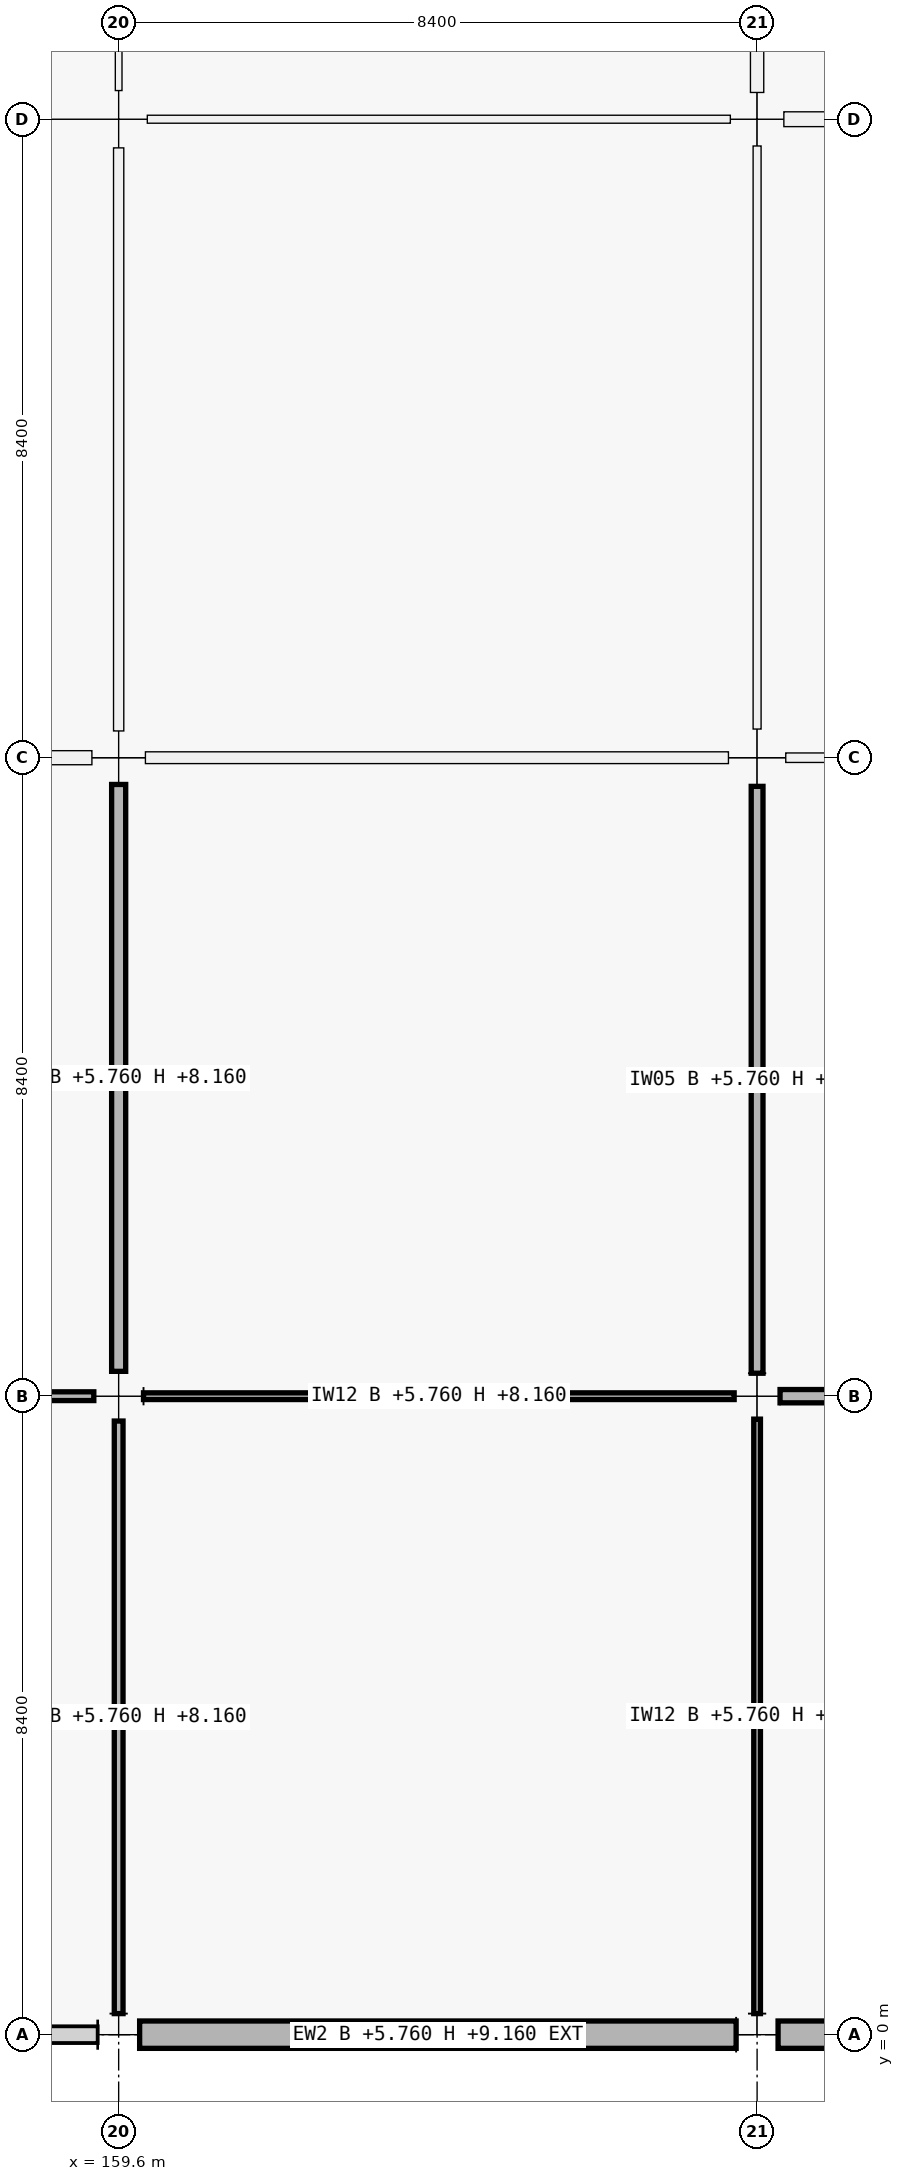
"""IFC4 building model, lengths in metres.
Left out: names, types, materials, properties, quantities, classifications, styles, units other than length and angle.
Written with IfcOpenShell. Run it as: python <this file> out.ifc"""

import sys

from ifc_helpers import new_model, si_unit, direction, frame, frame_2d, origin, origin_2d, place, context, subcontext, project, spatial, rectangle, extrude, element, fill, save


model = new_model("IFC4")
c1 = context("Model", 3, precision=1e-05, world=origin(), true_north=direction((0.0, 1.0)))
c2 = subcontext(c1, "Body", "Model", "MODEL_VIEW")
j1 = project(units=[si_unit("LENGTHUNIT", "METRE"), si_unit("PLANEANGLEUNIT", "RADIAN")], contexts=[c1])
p1 = place(None, origin())
s1 = spatial("IfcSite", under=j1, at=p1, CompositionType="ELEMENT")
p2 = place(p1, origin())
s2 = spatial("IfcBuilding", under=s1, at=p2, CompositionType="ELEMENT")
p3 = place(p2, frame((0.0, 0.0, 5.76)))
s3 = spatial("IfcBuildingStorey", under=s2, at=p3, CompositionType="ELEMENT", Elevation=5.76)
p4 = place(p3, frame((159.6, 0.0, 0.0), z_axis=(0.0, 0.0, 1.0), x_axis=(1.0, 0.0, 0.0)))
e1 = element("IfcColumn", 1, at=p4, inside=s3, PredefinedType="COLUMN", context=c2, shape_type="SweptSolid", body=[
    extrude(rectangle(XDim=0.55, YDim=0.55, at=origin_2d()), origin(), (0.0, 0.0, 1.0), 4.2),
])
p5 = place(p3, frame((159.6, 8.4, 0.0), z_axis=(0.0, 0.0, 1.0), x_axis=(1.0, 0.0, 0.0)))
e2 = element("IfcColumn", 2, at=p5, inside=s3, PredefinedType="COLUMN", context=c2, shape_type="SweptSolid", body=[
    extrude(rectangle(XDim=0.65, YDim=0.65, at=origin_2d()), origin(), (0.0, 0.0, 1.0), 4.5),
])
p6 = place(p3, frame((159.6, 16.8, 0.0), z_axis=(0.0, 0.0, 1.0), x_axis=(1.0, 0.0, 0.0)))
e3 = element("IfcColumn", 3, at=p6, inside=s3, PredefinedType="COLUMN", context=c2, shape_type="SweptSolid", body=[
    extrude(rectangle(XDim=0.7, YDim=0.7, at=origin_2d()), origin(), (0.0, 0.0, 1.0), 4.5),
])
p7 = place(p3, frame((159.6, 25.2, 0.0), z_axis=(0.0, 0.0, 1.0), x_axis=(1.0, 0.0, 0.0)))
e4 = element("IfcColumn", 4, at=p7, inside=s3, PredefinedType="COLUMN", context=c2, shape_type="SweptSolid", body=[
    extrude(rectangle(XDim=0.75, YDim=0.75, at=origin_2d()), origin(), (0.0, 0.0, 1.0), 4.5),
])
p8 = place(p3, frame((168.0, 0.0, 0.0), z_axis=(0.0, 0.0, 1.0), x_axis=(1.0, 0.0, 0.0)))
e5 = element("IfcColumn", 5, at=p8, inside=s3, PredefinedType="COLUMN", context=c2, shape_type="SweptSolid", body=[
    extrude(rectangle(XDim=0.55, YDim=0.55, at=origin_2d()), origin(), (0.0, 0.0, 1.0), 4.2),
])
p9 = place(p3, frame((168.0, 8.4, 0.0), z_axis=(0.0, 0.0, 1.0), x_axis=(1.0, 0.0, 0.0)))
e6 = element("IfcColumn", 6, at=p9, inside=s3, PredefinedType="COLUMN", context=c2, shape_type="SweptSolid", body=[
    extrude(rectangle(XDim=0.6, YDim=0.6, at=origin_2d()), origin(), (0.0, 0.0, 1.0), 4.5),
])
p10 = place(p3, frame((168.0, 16.8, 0.0), z_axis=(0.0, 0.0, 1.0), x_axis=(1.0, 0.0, 0.0)))
e7 = element("IfcColumn", 7, at=p10, inside=s3, PredefinedType="COLUMN", context=c2, shape_type="SweptSolid", body=[
    extrude(rectangle(XDim=0.75, YDim=0.75, at=origin_2d()), origin(), (0.0, 0.0, 1.0), 4.5),
])
p11 = place(p3, frame((168.0, 25.2, 0.0), z_axis=(0.0, 0.0, 1.0), x_axis=(1.0, 0.0, 0.0)))
e8 = element("IfcColumn", 8, at=p11, inside=s3, PredefinedType="COLUMN", context=c2, shape_type="SweptSolid", body=[
    extrude(rectangle(XDim=0.7, YDim=0.7, at=origin_2d()), origin(), (0.0, 0.0, 1.0), 4.5),
])
p12 = place(p3, frame((167.724, 0.0, 0.0), z_axis=(0.0, 0.0, 1.0), x_axis=(-1.0, 0.0, 0.0)))
e9 = element("IfcWall", 9, at=p12, inside=s3, PredefinedType="SOLIDWALL", context=c2, shape_type="SweptSolid", body=[
    extrude(rectangle(XDim=7.848, YDim=0.36, at=frame_2d((3.924, 0.0))), origin(), (0.0, 0.0, 1.0), 3.4),
])
p13 = place(p12, frame((3.199, 0.0, 0.9)))
e10 = element("IfcOpeningElement", 10, at=p13, cuts=e9, PredefinedType="OPENING", context=c2, shape_type="SweptSolid", body=[
    extrude(rectangle(XDim=1.45, YDim=1.85, at=frame_2d((0.725, 0.925))), frame((0.0, 0.18, 0.0), z_axis=(0.0, -1.0, 0.0), x_axis=(1.0, 0.0, 0.0)), (0.0, 0.0, 1.0), 0.36),
])
p14 = place(p3, frame((176.124, 0.0, 0.0), z_axis=(0.0, 0.0, 1.0), x_axis=(-1.0, 0.0, 0.0)))
e11 = element("IfcWall", 11, at=p14, inside=s3, PredefinedType="SOLIDWALL", context=c2, shape_type="SweptSolid", body=[
    extrude(rectangle(XDim=7.848, YDim=0.36, at=frame_2d((3.924, 0.0))), origin(), (0.0, 0.0, 1.0), 3.4),
])
p15 = place(p14, frame((3.049, 0.0, 0.9)))
e12 = element("IfcOpeningElement", 12, at=p15, cuts=e11, PredefinedType="OPENING", context=c2, shape_type="SweptSolid", body=[
    extrude(rectangle(XDim=1.75, YDim=1.95, at=frame_2d((0.875, 0.975))), frame((0.0, 0.18, 0.0), z_axis=(0.0, -1.0, 0.0), x_axis=(1.0, 0.0, 0.0)), (0.0, 0.0, 1.0), 0.36),
])
p16 = place(p3, frame((151.502, 8.4, 0.0), z_axis=(0.0, 0.0, 1.0), x_axis=(1.0, 0.0, 0.0)))
e13 = element("IfcWall", 13, at=p16, inside=s3, PredefinedType="PARTITIONING", context=c2, shape_type="SweptSolid", body=[
    extrude(rectangle(XDim=7.771, YDim=0.115, at=frame_2d((3.885, 0.0))), origin(), (0.0, 0.0, 1.0), 2.4),
])
p17 = place(p16, frame((3.396, 0.0, 0.0)))
e14 = element("IfcOpeningElement", 14, at=p17, cuts=e13, PredefinedType="OPENING", context=c2, shape_type="SweptSolid", body=[
    extrude(rectangle(XDim=0.98, YDim=2.18, at=frame_2d((0.49, 1.09))), frame((0.0, 0.058, 0.0), z_axis=(0.0, -1.0, 0.0), x_axis=(1.0, 0.0, 0.0)), (0.0, 0.0, 1.0), 0.115),
])
p18 = place(p3, frame((151.577, 16.8, 0.0), z_axis=(0.0, 0.0, 1.0), x_axis=(1.0, 0.0, 0.0)))
e15 = element("IfcWall", 15, at=p18, inside=s3, PredefinedType="PARTITIONING", context=c2, shape_type="SweptSolid", body=[
    extrude(rectangle(XDim=7.671, YDim=0.185, at=frame_2d((3.835, 0.0))), origin(), (0.0, 0.0, 1.0), 2.4),
])
p19 = place(p18, frame((3.356, 0.0, 0.0)))
e16 = element("IfcOpeningElement", 16, at=p19, cuts=e15, PredefinedType="OPENING", context=c2, shape_type="SweptSolid", body=[
    extrude(rectangle(XDim=0.96, YDim=2.18, at=frame_2d((0.48, 1.09))), frame((0.0, 0.093, 0.0), z_axis=(0.0, -1.0, 0.0), x_axis=(1.0, 0.0, 0.0)), (0.0, 0.0, 1.0), 0.185),
])
p20 = place(p3, frame((159.927, 8.4, 0.0), z_axis=(0.0, 0.0, 1.0), x_axis=(1.0, 0.0, 0.0)))
e17 = element("IfcWall", 17, at=p20, inside=s3, PredefinedType="PARTITIONING", context=c2, shape_type="SweptSolid", body=[
    extrude(rectangle(XDim=7.771, YDim=0.088, at=frame_2d((3.885, 0.0))), origin(), (0.0, 0.0, 1.0), 2.4),
])
p21 = place(p20, frame((3.381, 0.0, 0.0)))
e18 = element("IfcOpeningElement", 18, at=p21, cuts=e17, PredefinedType="OPENING", context=c2, shape_type="SweptSolid", body=[
    extrude(rectangle(XDim=1.01, YDim=2.12, at=frame_2d((0.505, 1.06))), frame((0.0, 0.044, 0.0), z_axis=(0.0, -1.0, 0.0), x_axis=(1.0, 0.0, 0.0)), (0.0, 0.0, 1.0), 0.088),
])
p22 = place(p3, frame((159.952, 16.8, 0.0), z_axis=(0.0, 0.0, 1.0), x_axis=(1.0, 0.0, 0.0)))
e19 = element("IfcWall", 19, at=p22, inside=s3, PredefinedType="PARTITIONING", context=c2, shape_type="SweptSolid", body=[
    extrude(rectangle(XDim=7.671, YDim=0.155, at=frame_2d((3.835, 0.0))), origin(), (0.0, 0.0, 1.0), 2.4),
])
p23 = place(p22, frame((3.325, 0.0, 0.0)))
e20 = element("IfcOpeningElement", 20, at=p23, cuts=e19, PredefinedType="OPENING", context=c2, shape_type="SweptSolid", body=[
    extrude(rectangle(XDim=1.02, YDim=2.2, at=frame_2d((0.51, 1.1))), frame((0.0, 0.078, 0.0), z_axis=(0.0, -1.0, 0.0), x_axis=(1.0, 0.0, 0.0)), (0.0, 0.0, 1.0), 0.155),
])
p24 = place(p3, frame((159.977, 25.2, 0.0), z_axis=(0.0, 0.0, 1.0), x_axis=(1.0, 0.0, 0.0)))
e21 = element("IfcWall", 21, at=p24, inside=s3, PredefinedType="PARTITIONING", context=c2, shape_type="SweptSolid", body=[
    extrude(rectangle(XDim=7.671, YDim=0.105, at=frame_2d((3.835, 0.0))), origin(), (0.0, 0.0, 1.0), 2.4),
])
p25 = place(p24, frame((3.331, 0.0, 0.0)))
e22 = element("IfcOpeningElement", 22, at=p25, cuts=e21, PredefinedType="OPENING", context=c2, shape_type="SweptSolid", body=[
    extrude(rectangle(XDim=1.01, YDim=2.12, at=frame_2d((0.505, 1.06))), frame((0.0, 0.052, 0.0), z_axis=(0.0, -1.0, 0.0), x_axis=(1.0, 0.0, 0.0)), (0.0, 0.0, 1.0), 0.105),
])
p26 = place(p3, frame((168.302, 8.4, 0.0), z_axis=(0.0, 0.0, 1.0), x_axis=(1.0, 0.0, 0.0)))
e23 = element("IfcWall", 23, at=p26, inside=s3, PredefinedType="PARTITIONING", context=c2, shape_type="SweptSolid", body=[
    extrude(rectangle(XDim=7.821, YDim=0.175, at=frame_2d((3.911, 0.0))), origin(), (0.0, 0.0, 1.0), 2.4),
])
p27 = place(p26, frame((3.37, 0.0, 0.0)))
e24 = element("IfcOpeningElement", 24, at=p27, cuts=e23, PredefinedType="OPENING", context=c2, shape_type="SweptSolid", body=[
    extrude(rectangle(XDim=1.08, YDim=2.22, at=frame_2d((0.54, 1.11))), frame((0.0, 0.087, 0.0), z_axis=(0.0, -1.0, 0.0), x_axis=(1.0, 0.0, 0.0)), (0.0, 0.0, 1.0), 0.175),
])
p28 = place(p3, frame((168.377, 16.8, 0.0), z_axis=(0.0, 0.0, 1.0), x_axis=(1.0, 0.0, 0.0)))
e25 = element("IfcWall", 25, at=p28, inside=s3, PredefinedType="PARTITIONING", context=c2, shape_type="SweptSolid", body=[
    extrude(rectangle(XDim=7.746, YDim=0.125, at=frame_2d((3.873, 0.0))), origin(), (0.0, 0.0, 1.0), 2.4),
])
p29 = place(p28, frame((3.343, 0.0, 0.0)))
e26 = element("IfcOpeningElement", 26, at=p29, cuts=e25, PredefinedType="OPENING", context=c2, shape_type="SweptSolid", body=[
    extrude(rectangle(XDim=1.06, YDim=2.22, at=frame_2d((0.53, 1.11))), frame((0.0, 0.062, 0.0), z_axis=(0.0, -1.0, 0.0), x_axis=(1.0, 0.0, 0.0)), (0.0, 0.0, 1.0), 0.125),
])
p30 = place(p3, frame((168.352, 25.2, 0.0), z_axis=(0.0, 0.0, 1.0), x_axis=(1.0, 0.0, 0.0)))
e27 = element("IfcWall", 27, at=p30, inside=s3, PredefinedType="PARTITIONING", context=c2, shape_type="SweptSolid", body=[
    extrude(rectangle(XDim=7.771, YDim=0.195, at=frame_2d((3.885, 0.0))), origin(), (0.0, 0.0, 1.0), 2.4),
])
p31 = place(p30, frame((3.385, 0.0, 0.0)))
e28 = element("IfcOpeningElement", 28, at=p31, cuts=e27, PredefinedType="OPENING", context=c2, shape_type="SweptSolid", body=[
    extrude(rectangle(XDim=1.0, YDim=2.2, at=frame_2d((0.5, 1.1))), frame((0.0, 0.098, 0.0), z_axis=(0.0, -1.0, 0.0), x_axis=(1.0, 0.0, 0.0)), (0.0, 0.0, 1.0), 0.195),
])
p32 = place(p3, frame((159.6, 0.277, 0.0), z_axis=(0.0, 0.0, 1.0), x_axis=(0.0, 1.0, 0.0)))
e29 = element("IfcWall", 29, at=p32, inside=s3, PredefinedType="PARTITIONING", context=c2, shape_type="SweptSolid", body=[
    extrude(rectangle(XDim=7.796, YDim=0.115, at=frame_2d((3.898, 0.0))), origin(), (0.0, 0.0, 1.0), 2.4),
])
p33 = place(p32, frame((3.358, 0.0, 0.0)))
e30 = element("IfcOpeningElement", 30, at=p33, cuts=e29, PredefinedType="OPENING", context=c2, shape_type="SweptSolid", body=[
    extrude(rectangle(XDim=1.08, YDim=2.22, at=frame_2d((0.54, 1.11))), frame((0.0, 0.058, 0.0), z_axis=(0.0, -1.0, 0.0), x_axis=(1.0, 0.0, 0.0)), (0.0, 0.0, 1.0), 0.115),
])
p34 = place(p3, frame((159.6, 8.727, 0.0), z_axis=(0.0, 0.0, 1.0), x_axis=(0.0, 1.0, 0.0)))
e31 = element("IfcWall", 31, at=p34, inside=s3, PredefinedType="PARTITIONING", context=c2, shape_type="SweptSolid", body=[
    extrude(rectangle(XDim=7.721, YDim=0.185, at=frame_2d((3.86, 0.0))), origin(), (0.0, 0.0, 1.0), 2.4),
])
p35 = place(p34, frame((3.33, 0.0, 0.0)))
e32 = element("IfcOpeningElement", 32, at=p35, cuts=e31, PredefinedType="OPENING", context=c2, shape_type="SweptSolid", body=[
    extrude(rectangle(XDim=1.06, YDim=2.22, at=frame_2d((0.53, 1.11))), frame((0.0, 0.093, 0.0), z_axis=(0.0, -1.0, 0.0), x_axis=(1.0, 0.0, 0.0)), (0.0, 0.0, 1.0), 0.185),
])
p36 = place(p3, frame((159.6, 17.152, 0.0), z_axis=(0.0, 0.0, 1.0), x_axis=(0.0, 1.0, 0.0)))
e33 = element("IfcWall", 33, at=p36, inside=s3, PredefinedType="PARTITIONING", context=c2, shape_type="SweptSolid", body=[
    extrude(rectangle(XDim=7.671, YDim=0.135, at=frame_2d((3.835, 0.0))), origin(), (0.0, 0.0, 1.0), 2.4),
])
p37 = place(p36, frame((3.331, 0.0, 0.0)))
e34 = element("IfcOpeningElement", 34, at=p37, cuts=e33, PredefinedType="OPENING", context=c2, shape_type="SweptSolid", body=[
    extrude(rectangle(XDim=1.01, YDim=2.12, at=frame_2d((0.505, 1.06))), frame((0.0, 0.067, 0.0), z_axis=(0.0, -1.0, 0.0), x_axis=(1.0, 0.0, 0.0)), (0.0, 0.0, 1.0), 0.135),
])
p38 = place(p3, frame((159.6, 25.577, 0.0), z_axis=(0.0, 0.0, 1.0), x_axis=(0.0, 1.0, 0.0)))
e35 = element("IfcWall", 35, at=p38, inside=s3, PredefinedType="PARTITIONING", context=c2, shape_type="SweptSolid", body=[
    extrude(rectangle(XDim=7.671, YDim=0.088, at=frame_2d((3.835, 0.0))), origin(), (0.0, 0.0, 1.0), 2.4),
])
p39 = place(p38, frame((3.376, 0.0, 0.0)))
e36 = element("IfcOpeningElement", 36, at=p39, cuts=e35, PredefinedType="OPENING", context=c2, shape_type="SweptSolid", body=[
    extrude(rectangle(XDim=0.92, YDim=2.15, at=frame_2d((0.46, 1.075))), frame((0.0, 0.044, 0.0), z_axis=(0.0, -1.0, 0.0), x_axis=(1.0, 0.0, 0.0)), (0.0, 0.0, 1.0), 0.088),
])
p40 = place(p3, frame((168.0, 0.277, 0.0), z_axis=(0.0, 0.0, 1.0), x_axis=(0.0, 1.0, 0.0)))
e37 = element("IfcWall", 37, at=p40, inside=s3, PredefinedType="PARTITIONING", context=c2, shape_type="SweptSolid", body=[
    extrude(rectangle(XDim=7.821, YDim=0.088, at=frame_2d((3.91, 0.0))), origin(), (0.0, 0.0, 1.0), 2.4),
])
p41 = place(p40, frame((3.41, 0.0, 0.0)))
e38 = element("IfcOpeningElement", 38, at=p41, cuts=e37, PredefinedType="OPENING", context=c2, shape_type="SweptSolid", body=[
    extrude(rectangle(XDim=1.0, YDim=2.2, at=frame_2d((0.5, 1.1))), frame((0.0, 0.044, 0.0), z_axis=(0.0, -1.0, 0.0), x_axis=(1.0, 0.0, 0.0)), (0.0, 0.0, 1.0), 0.088),
])
p42 = place(p3, frame((168.0, 8.702, 0.0), z_axis=(0.0, 0.0, 1.0), x_axis=(0.0, 1.0, 0.0)))
e39 = element("IfcWall", 39, at=p42, inside=s3, PredefinedType="PARTITIONING", context=c2, shape_type="SweptSolid", body=[
    extrude(rectangle(XDim=7.721, YDim=0.155, at=frame_2d((3.861, 0.0))), origin(), (0.0, 0.0, 1.0), 2.4),
])
p43 = place(p42, frame((3.37, 0.0, 0.0)))
e40 = element("IfcOpeningElement", 40, at=p43, cuts=e39, PredefinedType="OPENING", context=c2, shape_type="SweptSolid", body=[
    extrude(rectangle(XDim=0.98, YDim=2.18, at=frame_2d((0.49, 1.09))), frame((0.0, 0.078, 0.0), z_axis=(0.0, -1.0, 0.0), x_axis=(1.0, 0.0, 0.0)), (0.0, 0.0, 1.0), 0.155),
])
p44 = place(p3, frame((168.0, 17.177, 0.0), z_axis=(0.0, 0.0, 1.0), x_axis=(0.0, 1.0, 0.0)))
e41 = element("IfcWall", 41, at=p44, inside=s3, PredefinedType="PARTITIONING", context=c2, shape_type="SweptSolid", body=[
    extrude(rectangle(XDim=7.671, YDim=0.105, at=frame_2d((3.835, 0.0))), origin(), (0.0, 0.0, 1.0), 2.4),
])
p45 = place(p44, frame((3.356, 0.0, 0.0)))
e42 = element("IfcOpeningElement", 42, at=p45, cuts=e41, PredefinedType="OPENING", context=c2, shape_type="SweptSolid", body=[
    extrude(rectangle(XDim=0.96, YDim=2.18, at=frame_2d((0.48, 1.09))), frame((0.0, 0.052, 0.0), z_axis=(0.0, -1.0, 0.0), x_axis=(1.0, 0.0, 0.0)), (0.0, 0.0, 1.0), 0.105),
])
p46 = place(p3, frame((168.0, 25.552, 0.0), z_axis=(0.0, 0.0, 1.0), x_axis=(0.0, 1.0, 0.0)))
e43 = element("IfcWall", 43, at=p46, inside=s3, PredefinedType="PARTITIONING", context=c2, shape_type="SweptSolid", body=[
    extrude(rectangle(XDim=7.671, YDim=0.175, at=frame_2d((3.835, 0.0))), origin(), (0.0, 0.0, 1.0), 2.4),
])
p47 = place(p46, frame((3.351, 0.0, 0.0)))
e44 = element("IfcOpeningElement", 44, at=p47, cuts=e43, PredefinedType="OPENING", context=c2, shape_type="SweptSolid", body=[
    extrude(rectangle(XDim=0.97, YDim=2.12, at=frame_2d((0.485, 1.06))), frame((0.0, 0.087, 0.0), z_axis=(0.0, -1.0, 0.0), x_axis=(1.0, 0.0, 0.0)), (0.0, 0.0, 1.0), 0.175),
])
p48 = place(p13, origin())
e45 = element("IfcWindow", 45, at=p48, inside=s3, PartitioningType="SINGLE_PANEL", PredefinedType="WINDOW", context=c2, shape_type="SweptSolid", body=[
    extrude(rectangle(XDim=1.45, YDim=1.85, at=frame_2d((0.725, 0.925))), frame((0.0, 0.03, 0.0), z_axis=(0.0, -1.0, 0.0), x_axis=(1.0, 0.0, 0.0)), (0.0, 0.0, 1.0), 0.06),
])
fill(e10, e45)
p49 = place(p25, origin())
e46 = element("IfcDoor", 46, at=p49, inside=s3, OperationType="SINGLE_SWING_LEFT", PredefinedType="DOOR", context=c2, shape_type="SweptSolid", body=[
    extrude(rectangle(XDim=1.01, YDim=2.12, at=frame_2d((0.505, 1.06))), frame((0.0, 0.025, 0.0), z_axis=(0.0, -1.0, 0.0), x_axis=(1.0, 0.0, 0.0)), (0.0, 0.0, 1.0), 0.05),
])
fill(e22, e46)
p50 = place(p21, origin())
e47 = element("IfcDoor", 47, at=p50, inside=s3, OperationType="SINGLE_SWING_RIGHT", PredefinedType="DOOR", context=c2, shape_type="SweptSolid", body=[
    extrude(rectangle(XDim=1.01, YDim=2.12, at=frame_2d((0.505, 1.06))), frame((0.0, 0.025, 0.0), z_axis=(0.0, -1.0, 0.0), x_axis=(1.0, 0.0, 0.0)), (0.0, 0.0, 1.0), 0.05),
])
fill(e18, e47)
p51 = place(p37, origin())
e48 = element("IfcDoor", 48, at=p51, inside=s3, OperationType="SINGLE_SWING_LEFT", PredefinedType="DOOR", context=c2, shape_type="SweptSolid", body=[
    extrude(rectangle(XDim=1.01, YDim=2.12, at=frame_2d((0.505, 1.06))), frame((0.0, 0.025, 0.0), z_axis=(0.0, -1.0, 0.0), x_axis=(1.0, 0.0, 0.0)), (0.0, 0.0, 1.0), 0.05),
])
fill(e34, e48)
p52 = place(p23, origin())
e49 = element("IfcDoor", 49, at=p52, inside=s3, OperationType="SINGLE_SWING_LEFT", PredefinedType="DOOR", context=c2, shape_type="SweptSolid", body=[
    extrude(rectangle(XDim=1.02, YDim=2.2, at=frame_2d((0.51, 1.1))), frame((0.0, 0.025, 0.0), z_axis=(0.0, -1.0, 0.0), x_axis=(1.0, 0.0, 0.0)), (0.0, 0.0, 1.0), 0.05),
])
fill(e20, e49)
p53 = place(p33, origin())
e50 = element("IfcDoor", 50, at=p53, inside=s3, OperationType="SINGLE_SWING_LEFT", PredefinedType="DOOR", context=c2, shape_type="SweptSolid", body=[
    extrude(rectangle(XDim=1.08, YDim=2.22, at=frame_2d((0.54, 1.11))), frame((0.0, 0.025, 0.0), z_axis=(0.0, -1.0, 0.0), x_axis=(1.0, 0.0, 0.0)), (0.0, 0.0, 1.0), 0.05),
])
fill(e30, e50)
p54 = place(p35, origin())
e51 = element("IfcDoor", 51, at=p54, inside=s3, OperationType="SINGLE_SWING_RIGHT", PredefinedType="DOOR", context=c2, shape_type="SweptSolid", body=[
    extrude(rectangle(XDim=1.06, YDim=2.22, at=frame_2d((0.53, 1.11))), frame((0.0, 0.025, 0.0), z_axis=(0.0, -1.0, 0.0), x_axis=(1.0, 0.0, 0.0)), (0.0, 0.0, 1.0), 0.05),
])
fill(e32, e51)
p55 = place(p41, origin())
e52 = element("IfcDoor", 52, at=p55, inside=s3, OperationType="SINGLE_SWING_LEFT", PredefinedType="DOOR", context=c2, shape_type="SweptSolid", body=[
    extrude(rectangle(XDim=1.0, YDim=2.2, at=frame_2d((0.5, 1.1))), frame((0.0, 0.025, 0.0), z_axis=(0.0, -1.0, 0.0), x_axis=(1.0, 0.0, 0.0)), (0.0, 0.0, 1.0), 0.05),
])
fill(e38, e52)
p56 = place(p43, origin())
e53 = element("IfcDoor", 53, at=p56, inside=s3, OperationType="SINGLE_SWING_RIGHT", PredefinedType="DOOR", context=c2, shape_type="SweptSolid", body=[
    extrude(rectangle(XDim=0.98, YDim=2.18, at=frame_2d((0.49, 1.09))), frame((0.0, 0.025, 0.0), z_axis=(0.0, -1.0, 0.0), x_axis=(1.0, 0.0, 0.0)), (0.0, 0.0, 1.0), 0.05),
])
fill(e40, e53)
p57 = place(p45, origin())
e54 = element("IfcDoor", 54, at=p57, inside=s3, OperationType="SINGLE_SWING_LEFT", PredefinedType="DOOR", context=c2, shape_type="SweptSolid", body=[
    extrude(rectangle(XDim=0.96, YDim=2.18, at=frame_2d((0.48, 1.09))), frame((0.0, 0.025, 0.0), z_axis=(0.0, -1.0, 0.0), x_axis=(1.0, 0.0, 0.0)), (0.0, 0.0, 1.0), 0.05),
])
fill(e42, e54)
save(model, sys.argv[1])
